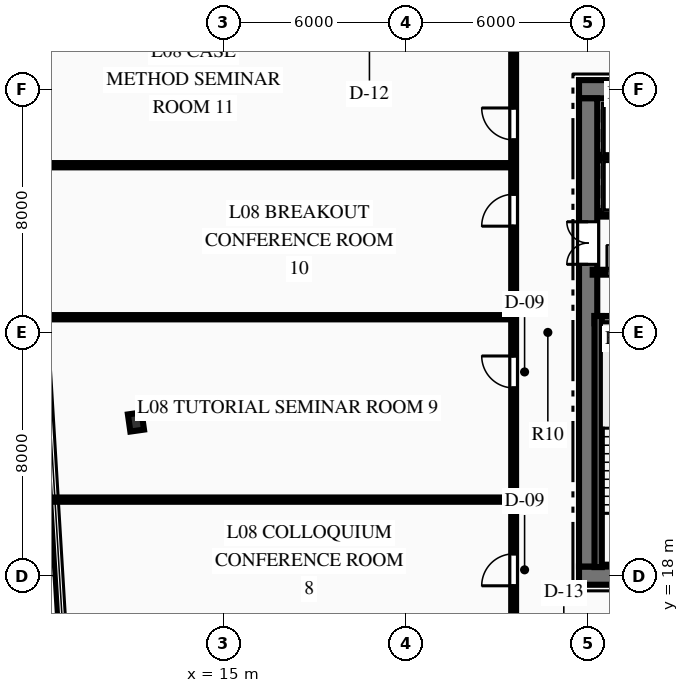
"""IFC4 building model, lengths in metres.
Left out: names, types, materials, properties, quantities, classifications, styles, units other than length and angle.
Written with IfcOpenShell. Run it as: python <this file> out.ifc"""

import sys

from ifc_helpers import new_model, si_unit, direction, frame, frame_2d, origin, origin_2d, place, context, subcontext, project, spatial, rectangle, i_section, extrude, element, fill, save


model = new_model("IFC4")
c1 = context("Model", 3, precision=1e-05, world=origin(), true_north=direction((0.0, 1.0)))
c2 = subcontext(c1, "Body", "Model", "MODEL_VIEW")
j1 = project(units=[si_unit("LENGTHUNIT", "METRE"), si_unit("PLANEANGLEUNIT", "RADIAN")], contexts=[c1])
p1 = place(None, origin())
s1 = spatial("IfcSite", under=j1, at=p1, CompositionType="ELEMENT")
p2 = place(p1, origin())
s2 = spatial("IfcBuilding", under=s1, at=p2, CompositionType="ELEMENT")
p3 = place(p2, frame((0.0, 0.0, 40.2)))
s3 = spatial("IfcBuildingStorey", under=s2, at=p3, CompositionType="ELEMENT", Elevation=40.2)
p4 = place(p3, frame((26.7, 18.0, 0.0), z_axis=(0.0, 0.0, 1.0), x_axis=(1.0, 0.0, 0.0)))
e1 = element("IfcWall", 1, at=p4, inside=s3, PredefinedType="SHEAR", context=c2, shape_type="SweptSolid", body=[
    extrude(rectangle(XDim=18.6, YDim=0.6, at=frame_2d((9.3, 0.0))), origin(), (0.0, 0.0, 1.0), 3.75),
])
p5 = place(p4, frame((7.4, 0.0, 0.0)))
e2 = element("IfcOpeningElement", 2, at=p5, cuts=e1, PredefinedType="OPENING", context=c2, shape_type="SweptSolid", body=[
    extrude(rectangle(XDim=1.1, YDim=2.15, at=frame_2d((0.55, 1.075))), frame((0.0, 0.31, 0.0), z_axis=(0.0, -1.0, 0.0), x_axis=(1.0, 0.0, 0.0)), (0.0, 0.0, 1.0), 0.62),
])
p6 = place(p4, frame((10.1, 0.0, 0.0)))
e3 = element("IfcOpeningElement", 3, at=p6, cuts=e1, PredefinedType="OPENING", context=c2, shape_type="SweptSolid", body=[
    extrude(rectangle(XDim=1.1, YDim=2.15, at=frame_2d((0.55, 1.075))), frame((0.0, 0.31, 0.0), z_axis=(0.0, -1.0, 0.0), x_axis=(1.0, 0.0, 0.0)), (0.0, 0.0, 1.0), 0.62),
])
p7 = place(p3, frame((26.7, 34.0, 0.0), z_axis=(0.0, 0.0, 1.0), x_axis=(1.0, 0.0, 0.0)))
e4 = element("IfcWall", 4, at=p7, inside=s3, PredefinedType="SHEAR", context=c2, shape_type="SweptSolid", body=[
    extrude(rectangle(XDim=18.6, YDim=0.6, at=frame_2d((9.3, 0.0))), origin(), (0.0, 0.0, 1.0), 3.75),
])
p8 = place(p7, frame((1.265, 0.0, 0.0)))
e5 = element("IfcOpeningElement", 5, at=p8, cuts=e4, PredefinedType="OPENING", context=c2, shape_type="SweptSolid", body=[
    extrude(rectangle(XDim=1.1, YDim=2.15, at=frame_2d((0.55, 1.075))), frame((0.0, 0.31, 0.0), z_axis=(0.0, -1.0, 0.0), x_axis=(1.0, 0.0, 0.0)), (0.0, 0.0, 1.0), 0.62),
])
p9 = place(p7, frame((3.515, 0.0, 0.0)))
e6 = element("IfcOpeningElement", 6, at=p9, cuts=e4, PredefinedType="OPENING", context=c2, shape_type="SweptSolid", body=[
    extrude(rectangle(XDim=1.1, YDim=2.15, at=frame_2d((0.55, 1.075))), frame((0.0, 0.31, 0.0), z_axis=(0.0, -1.0, 0.0), x_axis=(1.0, 0.0, 0.0)), (0.0, 0.0, 1.0), 0.62),
])
p10 = place(p7, frame((13.985, 0.0, 0.0)))
e7 = element("IfcOpeningElement", 7, at=p10, cuts=e4, PredefinedType="OPENING", context=c2, shape_type="SweptSolid", body=[
    extrude(rectangle(XDim=1.1, YDim=2.15, at=frame_2d((0.55, 1.075))), frame((0.0, 0.31, 0.0), z_axis=(0.0, -1.0, 0.0), x_axis=(1.0, 0.0, 0.0)), (0.0, 0.0, 1.0), 0.62),
])
p11 = place(p7, frame((16.235, 0.0, 0.0)))
e8 = element("IfcOpeningElement", 8, at=p11, cuts=e4, PredefinedType="OPENING", context=c2, shape_type="SweptSolid", body=[
    extrude(rectangle(XDim=1.1, YDim=2.15, at=frame_2d((0.55, 1.075))), frame((0.0, 0.31, 0.0), z_axis=(0.0, -1.0, 0.0), x_axis=(1.0, 0.0, 0.0)), (0.0, 0.0, 1.0), 0.62),
])
p12 = place(p3, frame((27.0, 18.3, 0.0), z_axis=(0.0, 0.0, 1.0), x_axis=(0.0, 1.0, 0.0)))
e9 = element("IfcWall", 9, at=p12, inside=s3, PredefinedType="SHEAR", context=c2, shape_type="SweptSolid", body=[
    extrude(rectangle(XDim=15.4, YDim=0.6, at=frame_2d((7.7, 0.0))), origin(), (0.0, 0.0, 1.0), 3.75),
])
p13 = place(p12, frame((9.94, 0.0, 0.0)))
e10 = element("IfcOpeningElement", 10, at=p13, cuts=e9, PredefinedType="OPENING", context=c2, shape_type="SweptSolid", body=[
    extrude(rectangle(XDim=1.4, YDim=2.2, at=frame_2d((0.7, 1.1))), frame((0.0, 0.31, 0.0), z_axis=(0.0, -1.0, 0.0), x_axis=(1.0, 0.0, 0.0)), (0.0, 0.0, 1.0), 0.62),
])
p14 = place(p3, frame((27.21, 26.42, 0.0), z_axis=(0.0, 0.0, 1.0), x_axis=(1.0, 0.0, 0.0)))
e11 = element("IfcWall", 11, at=p14, inside=s3, PredefinedType="SHEAR", context=c2, shape_type="SweptSolid", body=[
    extrude(rectangle(XDim=3.98, YDim=0.24, at=frame_2d((1.99, 0.0))), origin(), (0.0, 0.0, 1.0), 3.75),
])
p15 = place(p3, frame((27.33, 18.28, 0.0), z_axis=(0.0, 0.0, 1.0), x_axis=(0.0, 1.0, 0.0)))
e12 = element("IfcWall", 12, at=p15, inside=s3, PredefinedType="SHEAR", context=c2, shape_type="SweptSolid", body=[
    extrude(rectangle(XDim=8.26, YDim=0.24, at=frame_2d((4.13, 0.0))), origin(), (0.0, 0.0, 1.0), 3.75),
])
p16 = place(p3, frame((12.127, 23.053, 0.0), z_axis=(0.0, 0.0, 1.0), x_axis=(0.990146240249, 0.140037219771, 0.0)))
e13 = element("IfcColumn", 13, at=p16, inside=s3, PredefinedType="COLUMN", context=c2, shape_type="SweptSolid", body=[
    extrude(i_section(OverallWidth=0.454, OverallDepth=0.569, WebThickness=0.078, FlangeThickness=0.125, at=origin_2d()), origin(), (0.0, 0.0, 1.0), 3.75),
])
p17 = place(p3, frame((27.15, 27.98, 0.0), z_axis=(0.0, 0.0, 1.0), x_axis=(1.0, 0.0, 0.0)))
e14 = element("IfcWall", 14, at=p17, inside=s3, PredefinedType="PARTITIONING", context=c2, shape_type="SweptSolid", body=[
    extrude(rectangle(XDim=4.05, YDim=0.16, at=frame_2d((2.025, 0.0))), origin(), (0.0, 0.0, 1.0), 3.44),
])
p18 = place(p17, frame((0.47, 0.0, 0.0)))
e15 = element("IfcOpeningElement", 15, at=p18, cuts=e14, PredefinedType="OPENING", context=c2, shape_type="SweptSolid", body=[
    extrude(rectangle(XDim=0.9, YDim=2.15, at=frame_2d((0.45, 1.075))), frame((0.0, 0.09, 0.0), z_axis=(0.0, -1.0, 0.0), x_axis=(1.0, 0.0, 0.0)), (0.0, 0.0, 1.0), 0.18),
])
p19 = place(p17, frame((2.36, 0.0, 0.0)))
e16 = element("IfcOpeningElement", 16, at=p19, cuts=e14, PredefinedType="OPENING", context=c2, shape_type="SweptSolid", body=[
    extrude(rectangle(XDim=0.9, YDim=2.15, at=frame_2d((0.45, 1.075))), frame((0.0, 0.09, 0.0), z_axis=(0.0, -1.0, 0.0), x_axis=(1.0, 0.0, 0.0)), (0.0, 0.0, 1.0), 0.18),
])
p20 = place(p3, frame((27.45, 29.9, 0.0), z_axis=(0.0, 0.0, 1.0), x_axis=(1.0, 0.0, 0.0)))
e17 = element("IfcWall", 17, at=p20, inside=s3, PredefinedType="PARTITIONING", context=c2, shape_type="SweptSolid", body=[
    extrude(rectangle(XDim=4.43, YDim=0.18, at=frame_2d((2.215, 0.0))), origin(), (0.0, 0.0, 1.0), 3.44),
])
p21 = place(p20, frame((0.515, 0.0, 0.0)))
e18 = element("IfcOpeningElement", 18, at=p21, cuts=e17, PredefinedType="OPENING", context=c2, shape_type="SweptSolid", body=[
    extrude(rectangle(XDim=1.1, YDim=2.15, at=frame_2d((0.55, 1.075))), frame((0.0, 0.1, 0.0), z_axis=(0.0, -1.0, 0.0), x_axis=(1.0, 0.0, 0.0)), (0.0, 0.0, 1.0), 0.2),
])
p22 = place(p20, frame((2.765, 0.0, 0.0)))
e19 = element("IfcOpeningElement", 19, at=p22, cuts=e17, PredefinedType="OPENING", context=c2, shape_type="SweptSolid", body=[
    extrude(rectangle(XDim=1.1, YDim=2.15, at=frame_2d((0.55, 1.075))), frame((0.0, 0.1, 0.0), z_axis=(0.0, -1.0, 0.0), x_axis=(1.0, 0.0, 0.0)), (0.0, 0.0, 1.0), 0.2),
])
p23 = place(p3, frame((27.45, 31.75, 0.0), z_axis=(0.0, 0.0, 1.0), x_axis=(1.0, 0.0, 0.0)))
e20 = element("IfcWall", 20, at=p23, inside=s3, PredefinedType="PARTITIONING", context=c2, shape_type="SweptSolid", body=[
    extrude(rectangle(XDim=4.43, YDim=0.18, at=frame_2d((2.215, 0.0))), origin(), (0.0, 0.0, 1.0), 3.44),
])
p24 = place(p3, frame((24.55, 15.55, 0.0), z_axis=(0.0, 0.0, 1.0), x_axis=(0.0, 1.0, 0.0)))
e21 = element("IfcWall", 21, at=p24, inside=s3, PredefinedType="PARTITIONING", context=c2, shape_type="SweptSolid", body=[
    extrude(rectangle(XDim=20.9, YDim=0.16, at=frame_2d((10.45, 0.0))), origin(), (0.0, 0.0, 1.0), 3.44),
])
p25 = place(p24, frame((2.116, 0.0, 0.0)))
e22 = element("IfcOpeningElement", 22, at=p25, cuts=e21, PredefinedType="OPENING", context=c2, shape_type="SweptSolid", body=[
    extrude(rectangle(XDim=1.05, YDim=2.15, at=frame_2d((0.525, 1.075))), frame((0.0, 0.09, 0.0), z_axis=(0.0, -1.0, 0.0), x_axis=(1.0, 0.0, 0.0)), (0.0, 0.0, 1.0), 0.18),
])
p26 = place(p24, frame((8.625, 0.0, 0.0)))
e23 = element("IfcOpeningElement", 23, at=p26, cuts=e21, PredefinedType="OPENING", context=c2, shape_type="SweptSolid", body=[
    extrude(rectangle(XDim=1.05, YDim=2.15, at=frame_2d((0.525, 1.075))), frame((0.0, 0.09, 0.0), z_axis=(0.0, -1.0, 0.0), x_axis=(1.0, 0.0, 0.0)), (0.0, 0.0, 1.0), 0.18),
])
p27 = place(p24, frame((13.945, 0.0, 0.0)))
e24 = element("IfcOpeningElement", 24, at=p27, cuts=e21, PredefinedType="OPENING", context=c2, shape_type="SweptSolid", body=[
    extrude(rectangle(XDim=1.05, YDim=2.15, at=frame_2d((0.525, 1.075))), frame((0.0, 0.09, 0.0), z_axis=(0.0, -1.0, 0.0), x_axis=(1.0, 0.0, 0.0)), (0.0, 0.0, 1.0), 0.18),
])
p28 = place(p24, frame((16.783, 0.0, 0.0)))
e25 = element("IfcOpeningElement", 25, at=p28, cuts=e21, PredefinedType="OPENING", context=c2, shape_type="SweptSolid", body=[
    extrude(rectangle(XDim=1.05, YDim=2.15, at=frame_2d((0.525, 1.075))), frame((0.0, 0.09, 0.0), z_axis=(0.0, -1.0, 0.0), x_axis=(1.0, 0.0, 0.0)), (0.0, 0.0, 1.0), 0.18),
])
p29 = place(p3, frame((9.323, 20.5, 0.0), z_axis=(0.0, 0.0, 1.0), x_axis=(1.0, 0.0, 0.0)))
e26 = element("IfcWall", 26, at=p29, inside=s3, PredefinedType="PARTITIONING", context=c2, shape_type="SweptSolid", body=[
    extrude(rectangle(XDim=15.228, YDim=0.14, at=frame_2d((7.614, 0.0))), origin(), (0.0, 0.0, 1.0), 3.44),
])
p30 = place(p3, frame((8.961, 26.5, 0.0), z_axis=(0.0, 0.0, 1.0), x_axis=(1.0, 0.0, 0.0)))
e27 = element("IfcWall", 27, at=p30, inside=s3, PredefinedType="PARTITIONING", context=c2, shape_type="SweptSolid", body=[
    extrude(rectangle(XDim=15.589, YDim=0.14, at=frame_2d((7.794, 0.0))), origin(), (0.0, 0.0, 1.0), 3.44),
])
p31 = place(p3, frame((8.659, 31.5, 0.0), z_axis=(0.0, 0.0, 1.0), x_axis=(1.0, 0.0, 0.0)))
e28 = element("IfcWall", 28, at=p31, inside=s3, PredefinedType="PARTITIONING", context=c2, shape_type="SweptSolid", body=[
    extrude(rectangle(XDim=15.891, YDim=0.14, at=frame_2d((7.945, 0.0))), origin(), (0.0, 0.0, 1.0), 3.44),
])
p32 = place(p18, origin())
e29 = element("IfcDoor", 29, at=p32, inside=s3, OperationType="SINGLE_SWING_LEFT", PredefinedType="DOOR", context=c2, shape_type="SweptSolid", body=[
    extrude(rectangle(XDim=0.9, YDim=2.15, at=frame_2d((0.45, 1.075))), frame((0.0, 0.025, 0.0), z_axis=(0.0, -1.0, 0.0), x_axis=(1.0, 0.0, 0.0)), (0.0, 0.0, 1.0), 0.05),
])
fill(e15, e29)
p33 = place(p13, origin())
e30 = element("IfcDoor", 30, at=p33, inside=s3, OperationType="DOUBLE_DOOR_SINGLE_SWING", PredefinedType="DOOR", context=c2, shape_type="SweptSolid", body=[
    extrude(rectangle(XDim=1.4, YDim=2.2, at=frame_2d((0.7, 1.1))), frame((0.0, 0.025, 0.0), z_axis=(0.0, -1.0, 0.0), x_axis=(1.0, 0.0, 0.0)), (0.0, 0.0, 1.0), 0.05),
])
fill(e10, e30)
p34 = place(p25, origin())
e31 = element("IfcDoor", 31, at=p34, inside=s3, OperationType="SINGLE_SWING_LEFT", PredefinedType="DOOR", context=c2, shape_type="SweptSolid", body=[
    extrude(rectangle(XDim=1.05, YDim=2.15, at=frame_2d((0.525, 1.075))), frame((0.0, 0.025, 0.0), z_axis=(0.0, -1.0, 0.0), x_axis=(1.0, 0.0, 0.0)), (0.0, 0.0, 1.0), 0.05),
])
fill(e22, e31)
p35 = place(p26, origin())
e32 = element("IfcDoor", 32, at=p35, inside=s3, OperationType="SINGLE_SWING_RIGHT", PredefinedType="DOOR", context=c2, shape_type="SweptSolid", body=[
    extrude(rectangle(XDim=1.05, YDim=2.15, at=frame_2d((0.525, 1.075))), frame((0.0, 0.025, 0.0), z_axis=(0.0, -1.0, 0.0), x_axis=(1.0, 0.0, 0.0)), (0.0, 0.0, 1.0), 0.05),
])
fill(e23, e32)
p36 = place(p27, origin())
e33 = element("IfcDoor", 33, at=p36, inside=s3, OperationType="SINGLE_SWING_LEFT", PredefinedType="DOOR", context=c2, shape_type="SweptSolid", body=[
    extrude(rectangle(XDim=1.05, YDim=2.15, at=frame_2d((0.525, 1.075))), frame((0.0, 0.025, 0.0), z_axis=(0.0, -1.0, 0.0), x_axis=(1.0, 0.0, 0.0)), (0.0, 0.0, 1.0), 0.05),
])
fill(e24, e33)
p37 = place(p28, origin())
e34 = element("IfcDoor", 34, at=p37, inside=s3, OperationType="SINGLE_SWING_RIGHT", PredefinedType="DOOR", context=c2, shape_type="SweptSolid", body=[
    extrude(rectangle(XDim=1.05, YDim=2.15, at=frame_2d((0.525, 1.075))), frame((0.0, 0.025, 0.0), z_axis=(0.0, -1.0, 0.0), x_axis=(1.0, 0.0, 0.0)), (0.0, 0.0, 1.0), 0.05),
])
fill(e25, e34)
save(model, sys.argv[1])
